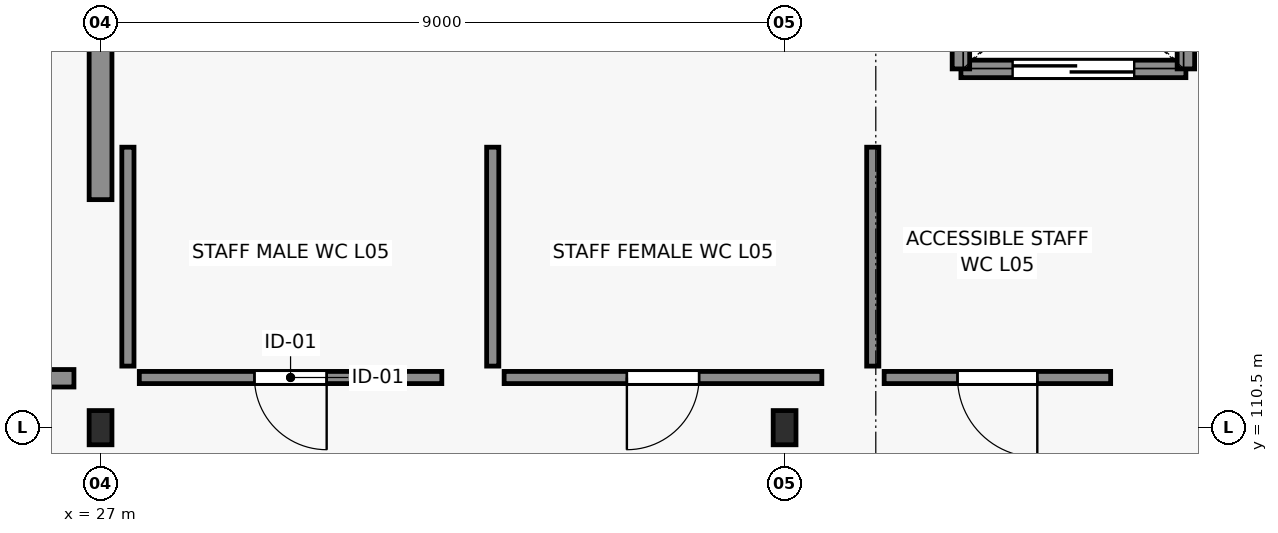
"""IFC4 building model, lengths in metres.
Left out: names, types, materials, properties, quantities, classifications, styles, units other than length and angle.
Written with IfcOpenShell. Run it as: python <this file> out.ifc"""

import sys

from ifc_helpers import new_model, si_unit, direction, frame, frame_2d, origin, origin_2d, place, context, subcontext, project, spatial, rectangle, i_section, extrude, element, fill, save


model = new_model("IFC4")
c1 = context("Model", 3, precision=1e-05, world=origin(), true_north=direction((0.0, 1.0)))
c2 = subcontext(c1, "Body", "Model", "MODEL_VIEW")
j1 = project(units=[si_unit("LENGTHUNIT", "METRE"), si_unit("PLANEANGLEUNIT", "RADIAN")], contexts=[c1])
p1 = place(None, origin())
s1 = spatial("IfcSite", under=j1, at=p1, CompositionType="ELEMENT")
p2 = place(p1, origin())
s2 = spatial("IfcBuilding", under=s1, at=p2, CompositionType="ELEMENT")
p3 = place(p2, frame((0.0, 0.0, 24.0)))
s3 = spatial("IfcBuildingStorey", under=s2, at=p3, CompositionType="ELEMENT", Elevation=24.0)
for number, where, z_axis, x_axis in (
    (1, (27.0, 110.5, 0.0), (0.0, 0.0, 1.0), (1.0, 0.0, 0.0)),
    (2, (36.0, 110.5, 0.0), (0.0, 0.0, 1.0), (1.0, 0.0, 0.0)),
):
    element("IfcColumn", number, at=place(p3, frame(where, z_axis=z_axis, x_axis=x_axis)), inside=s3, PredefinedType="COLUMN", context=c2, shape_type="SweptSolid", body=[
        extrude(i_section(OverallWidth=0.3, OverallDepth=0.45, WebThickness=0.014, FlangeThickness=0.026, FilletRadius=0.027, at=origin_2d()), origin(), (0.0, 0.0, 1.0), 3.98),
    ])
p4 = place(p3, frame((27.0, 113.5, 0.0), z_axis=(0.0, 0.0, 1.0), x_axis=(0.0, 1.0, 0.0)))
e3 = element("IfcWall", 3, at=p4, inside=s3, PredefinedType="SHEAR", context=c2, shape_type="SweptSolid", body=[
    extrude(rectangle(XDim=4.825, YDim=0.3, at=frame_2d((2.413, 0.0))), origin(), (0.0, 0.0, 1.0), 3.98),
])
p5 = place(p3, frame((31.49, 111.16, 0.0), z_axis=(0.0, 0.0, 1.0), x_axis=(-1.0, 0.0, 0.0)))
e4 = element("IfcWall", 4, at=p5, inside=s3, PredefinedType="PARTITIONING", context=c2, shape_type="SweptSolid", body=[
    extrude(rectangle(XDim=3.98, YDim=0.16, at=frame_2d((1.99, 0.0))), origin(), (0.0, 0.0, 1.0), 3.75),
])
p6 = place(p5, frame((1.515, 0.0, 0.0)))
e5 = element("IfcOpeningElement", 5, at=p6, cuts=e4, PredefinedType="OPENING", context=c2, shape_type="SweptSolid", body=[
    extrude(rectangle(XDim=0.95, YDim=2.15, at=frame_2d((0.475, 1.075))), frame((0.0, 0.09, 0.0), z_axis=(0.0, -1.0, 0.0), x_axis=(1.0, 0.0, 0.0)), (0.0, 0.0, 1.0), 0.18),
])
p7 = place(p3, frame((27.36, 111.31, 0.0), z_axis=(0.0, 0.0, 1.0), x_axis=(0.0, 1.0, 0.0)))
e6 = element("IfcWall", 6, at=p7, inside=s3, PredefinedType="PARTITIONING", context=c2, shape_type="SweptSolid", body=[
    extrude(rectangle(XDim=2.88, YDim=0.16, at=frame_2d((1.44, 0.0))), origin(), (0.0, 0.0, 1.0), 3.95),
])
p8 = place(p3, frame((36.49, 111.16, 0.0), z_axis=(0.0, 0.0, 1.0), x_axis=(-1.0, 0.0, 0.0)))
e7 = element("IfcWall", 7, at=p8, inside=s3, PredefinedType="PARTITIONING", context=c2, shape_type="SweptSolid", body=[
    extrude(rectangle(XDim=4.18, YDim=0.16, at=frame_2d((2.09, 0.0))), origin(), (0.0, 0.0, 1.0), 3.5),
])
p9 = place(p8, frame((1.615, 0.0, 0.0)))
e8 = element("IfcOpeningElement", 8, at=p9, cuts=e7, PredefinedType="OPENING", context=c2, shape_type="SweptSolid", body=[
    extrude(rectangle(XDim=0.95, YDim=2.15, at=frame_2d((0.475, 1.075))), frame((0.0, 0.09, 0.0), z_axis=(0.0, -1.0, 0.0), x_axis=(1.0, 0.0, 0.0)), (0.0, 0.0, 1.0), 0.18),
])
p10 = place(p3, frame((32.16, 111.31, 0.0), z_axis=(0.0, 0.0, 1.0), x_axis=(0.0, 1.0, 0.0)))
e9 = element("IfcWall", 9, at=p10, inside=s3, PredefinedType="PARTITIONING", context=c2, shape_type="SweptSolid", body=[
    extrude(rectangle(XDim=2.88, YDim=0.16, at=frame_2d((1.44, 0.0))), origin(), (0.0, 0.0, 1.0), 3.95),
])
p11 = place(p3, frame((40.29, 111.16, 0.0), z_axis=(0.0, 0.0, 1.0), x_axis=(-1.0, 0.0, 0.0)))
e10 = element("IfcWall", 10, at=p11, inside=s3, PredefinedType="PARTITIONING", context=c2, shape_type="SweptSolid", body=[
    extrude(rectangle(XDim=2.98, YDim=0.16, at=frame_2d((1.49, 0.0))), origin(), (0.0, 0.0, 1.0), 3.75),
])
p12 = place(p11, frame((0.965, 0.0, 0.0)))
e11 = element("IfcOpeningElement", 11, at=p12, cuts=e10, PredefinedType="OPENING", context=c2, shape_type="SweptSolid", body=[
    extrude(rectangle(XDim=1.05, YDim=2.2, at=frame_2d((0.525, 1.1))), frame((0.0, 0.09, 0.0), z_axis=(0.0, -1.0, 0.0), x_axis=(1.0, 0.0, 0.0)), (0.0, 0.0, 1.0), 0.18),
])
p13 = place(p3, frame((37.16, 111.31, 0.0), z_axis=(0.0, 0.0, 1.0), x_axis=(0.0, 1.0, 0.0)))
e12 = element("IfcWall", 12, at=p13, inside=s3, PredefinedType="PARTITIONING", context=c2, shape_type="SweptSolid", body=[
    extrude(rectangle(XDim=2.88, YDim=0.16, at=frame_2d((1.44, 0.0))), origin(), (0.0, 0.0, 1.0), 3.95),
])
p14 = place(p3, frame((41.28, 115.22, 0.0), z_axis=(0.0, 0.0, 1.0), x_axis=(-1.0, 0.0, 0.0)))
e13 = element("IfcWall", 13, at=p14, inside=s3, PredefinedType="SOLIDWALL", context=c2, shape_type="SweptSolid", body=[
    extrude(rectangle(XDim=2.96, YDim=0.23, at=frame_2d((1.48, 0.0))), origin(), (0.0, 0.0, 1.0), 3.75),
])
p15 = place(p14, frame((0.68, 0.0, 0.0)))
e14 = element("IfcOpeningElement", 14, at=p15, cuts=e13, PredefinedType="OPENING", context=c2, shape_type="SweptSolid", body=[
    extrude(rectangle(XDim=1.6, YDim=2.3, at=frame_2d((0.8, 1.15))), frame((0.0, 0.125, 0.0), z_axis=(0.0, -1.0, 0.0), x_axis=(1.0, 0.0, 0.0)), (0.0, 0.0, 1.0), 0.25),
])
for number, where, z_axis, x_axis in (
    (15, (38.32, 115.22, 0.0), (0.0, 0.0, 1.0), (0.0, 1.0, 0.0)),
    (16, (41.28, 117.78, 0.0), (0.0, 0.0, 1.0), (0.0, -1.0, 0.0)),
):
    element("IfcWall", number, at=place(p3, frame(where, z_axis=z_axis, x_axis=x_axis)), inside=s3, PredefinedType="SOLIDWALL", context=c2, shape_type="SweptSolid", body=[
        extrude(rectangle(XDim=2.56, YDim=0.23, at=frame_2d((1.28, 0.0))), origin(), (0.0, 0.0, 1.0), 3.96),
    ])
p16 = place(p3, frame((15.3, 111.15, 0.0), z_axis=(0.0, 0.0, 1.0), x_axis=(1.0, 0.0, 0.0)))
e17 = element("IfcWall", 17, at=p16, inside=s3, PredefinedType="SOLIDWALL", context=c2, shape_type="SweptSolid", body=[
    extrude(rectangle(XDim=11.35, YDim=0.23, at=frame_2d((5.675, 0.0))), origin(), (0.0, 0.0, 1.0), 3.5),
])
p17 = place(p16, frame((0.55, 0.0, 0.0)))
e18 = element("IfcOpeningElement", 18, at=p17, cuts=e17, PredefinedType="OPENING", context=c2, shape_type="SweptSolid", body=[
    extrude(rectangle(XDim=1.8, YDim=2.3, at=frame_2d((0.9, 1.15))), frame((0.0, 0.125, 0.0), z_axis=(0.0, -1.0, 0.0), x_axis=(1.0, 0.0, 0.0)), (0.0, 0.0, 1.0), 0.25),
])
p18 = place(p6, origin())
e19 = element("IfcDoor", 19, at=p18, inside=s3, OperationType="SINGLE_SWING_LEFT", PredefinedType="DOOR", context=c2, shape_type="SweptSolid", body=[
    extrude(rectangle(XDim=0.95, YDim=2.15, at=frame_2d((0.475, 1.075))), frame((0.0, 0.025, 0.0), z_axis=(0.0, -1.0, 0.0), x_axis=(1.0, 0.0, 0.0)), (0.0, 0.0, 1.0), 0.05),
])
fill(e5, e19)
p19 = place(p9, origin())
e20 = element("IfcDoor", 20, at=p19, inside=s3, OperationType="SINGLE_SWING_RIGHT", PredefinedType="DOOR", context=c2, shape_type="SweptSolid", body=[
    extrude(rectangle(XDim=0.95, YDim=2.15, at=frame_2d((0.475, 1.075))), frame((0.0, 0.025, 0.0), z_axis=(0.0, -1.0, 0.0), x_axis=(1.0, 0.0, 0.0)), (0.0, 0.0, 1.0), 0.05),
])
fill(e8, e20)
p20 = place(p12, origin())
e21 = element("IfcDoor", 21, at=p20, inside=s3, OperationType="SINGLE_SWING_LEFT", PredefinedType="DOOR", context=c2, shape_type="SweptSolid", body=[
    extrude(rectangle(XDim=1.05, YDim=2.2, at=frame_2d((0.525, 1.1))), frame((0.0, 0.025, 0.0), z_axis=(0.0, -1.0, 0.0), x_axis=(1.0, 0.0, 0.0)), (0.0, 0.0, 1.0), 0.05),
])
fill(e11, e21)
p21 = place(p15, origin())
e22 = element("IfcDoor", 22, at=p21, inside=s3, OperationType="DOUBLE_DOOR_SLIDING", PredefinedType="DOOR", context=c2, shape_type="SweptSolid", body=[
    extrude(rectangle(XDim=1.6, YDim=2.3, at=frame_2d((0.8, 1.15))), frame((0.0, 0.025, 0.0), z_axis=(0.0, -1.0, 0.0), x_axis=(1.0, 0.0, 0.0)), (0.0, 0.0, 1.0), 0.05),
])
fill(e14, e22)
save(model, sys.argv[1])
